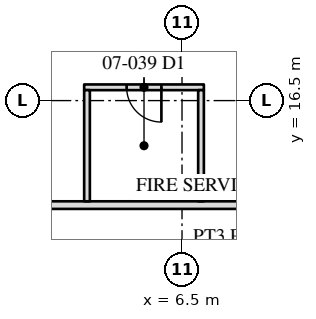
"""IFC4 building model, lengths in metres.
Left out: names, types, materials, properties, quantities, classifications, styles, units other than length and angle.
Written with IfcOpenShell. Run it as: python <this file> out.ifc"""

import sys

from ifc_helpers import new_model, si_unit, direction, frame, frame_2d, origin, place, context, subcontext, project, spatial, rectangle, extrude, element, fill, save


model = new_model("IFC4")
c1 = context("Model", 3, precision=1e-05, world=origin(), true_north=direction((0.0, 1.0)))
c2 = subcontext(c1, "Body", "Model", "MODEL_VIEW")
j1 = project(units=[si_unit("LENGTHUNIT", "METRE"), si_unit("PLANEANGLEUNIT", "RADIAN")], contexts=[c1])
p1 = place(None, origin())
s1 = spatial("IfcSite", under=j1, at=p1, CompositionType="ELEMENT")
p2 = place(p1, origin())
s2 = spatial("IfcBuilding", under=s1, at=p2, CompositionType="ELEMENT")
p3 = place(p2, frame((0.0, 0.0, 32.4)))
s3 = spatial("IfcBuildingStorey", under=s2, at=p3, CompositionType="ELEMENT", Elevation=32.4)
p4 = place(p3, frame((13.85, 13.75, 0.0), z_axis=(0.0, 0.0, 1.0), x_axis=(-1.0, 0.0, 0.0)))
e1 = element("IfcWall", 1, at=p4, inside=s3, PredefinedType="PARTITIONING", context=c2, shape_type="SweptSolid", body=[
    extrude(rectangle(XDim=27.5, YDim=0.2, at=frame_2d((13.75, 0.0))), origin(), (0.0, 0.0, 1.0), 3.91),
])
p5 = place(p3, frame((7.075, 16.85, 0.0), z_axis=(0.0, 0.0, 1.0), x_axis=(-1.0, 0.0, 0.0)))
e2 = element("IfcWall", 2, at=p5, inside=s3, PredefinedType="PARTITIONING", context=c2, shape_type="SweptSolid", body=[
    extrude(rectangle(XDim=3.15, YDim=0.15, at=frame_2d((1.575, 0.0))), origin(), (0.0, 0.0, 1.0), 3.91),
])
p6 = place(p5, frame((1.117, 0.0, 0.0)))
e3 = element("IfcOpeningElement", 3, at=p6, cuts=e2, PredefinedType="OPENING", context=c2, shape_type="SweptSolid", body=[
    extrude(rectangle(XDim=0.915, YDim=2.134, at=frame_2d((0.458, 1.067))), frame((0.0, 0.085, 0.0), z_axis=(0.0, -1.0, 0.0), x_axis=(1.0, 0.0, 0.0)), (0.0, 0.0, 1.0), 0.17),
])
for number, where, z_axis, x_axis in (
    (4, (7.0, 16.775, 0.0), (0.0, 0.0, 1.0), (0.0, -1.0, 0.0)),
    (5, (4.0, 16.775, 0.0), (0.0, 0.0, 1.0), (0.0, -1.0, 0.0)),
):
    element("IfcWall", number, at=place(p3, frame(where, z_axis=z_axis, x_axis=x_axis)), inside=s3, PredefinedType="PARTITIONING", context=c2, shape_type="SweptSolid", body=[
        extrude(rectangle(XDim=2.925, YDim=0.15, at=frame_2d((1.462, 0.0))), origin(), (0.0, 0.0, 1.0), 3.91),
    ])
p7 = place(p6, origin())
e6 = element("IfcDoor", 6, at=p7, inside=s3, OperationType="SINGLE_SWING_LEFT", PredefinedType="DOOR", context=c2, shape_type="SweptSolid", body=[
    extrude(rectangle(XDim=0.915, YDim=2.134, at=frame_2d((0.458, 1.067))), frame((0.0, 0.025, 0.0), z_axis=(0.0, -1.0, 0.0), x_axis=(1.0, 0.0, 0.0)), (0.0, 0.0, 1.0), 0.05),
])
fill(e3, e6)
save(model, sys.argv[1])
